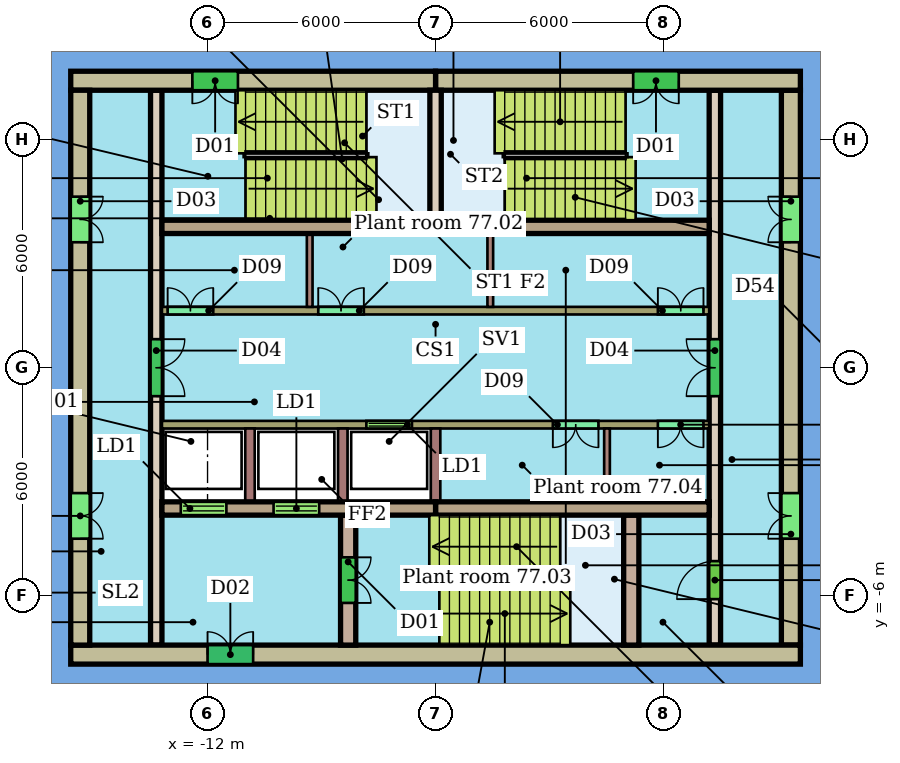
"""IFC4 building model, lengths in metres.
Left out: names, types, materials, properties, quantities, classifications, styles, units other than length and angle.
Written with IfcOpenShell. Run it as: python <this file> out.ifc"""

import sys

from ifc_helpers import new_model, si_unit, direction, frame, frame_2d, origin, place, context, subcontext, project, spatial, rectangle, extrude, element, fill, save


model = new_model("IFC4")
c1 = context("Model", 3, precision=1e-05, world=origin(), true_north=direction((0.0, 1.0)))
c2 = subcontext(c1, "Body", "Model", "MODEL_VIEW")
j1 = project(units=[si_unit("LENGTHUNIT", "METRE"), si_unit("PLANEANGLEUNIT", "RADIAN")], contexts=[c1])
p1 = place(None, origin())
s1 = spatial("IfcSite", under=j1, at=p1, CompositionType="ELEMENT")
p2 = place(p1, origin())
s2 = spatial("IfcBuilding", under=s1, at=p2, CompositionType="ELEMENT")
p3 = place(p2, frame((0.0, 0.0, 308.7)))
s3 = spatial("IfcBuildingStorey", under=s2, at=p3, CompositionType="ELEMENT", Elevation=308.7)
p4 = place(p3, frame((3.6, 7.55, 0.0), z_axis=(0.0, 0.0, 1.0), x_axis=(-1.0, 0.0, 0.0)))
e1 = element("IfcWall", 1, at=p4, inside=s3, PredefinedType="SHEAR", context=c2, shape_type="SweptSolid", body=[
    extrude(rectangle(XDim=9.6, YDim=0.5, at=frame_2d((4.8, 0.0))), origin(), (0.0, 0.0, 1.0), 3.9),
])
p5 = place(p4, frame((3.2, 0.0, 0.0)))
e2 = element("IfcOpeningElement", 2, at=p5, cuts=e1, PredefinedType="OPENING", context=c2, shape_type="SweptSolid", body=[
    extrude(rectangle(XDim=1.2, YDim=2.1, at=frame_2d((0.6, 1.05))), frame((0.0, 0.26, 0.0), z_axis=(0.0, -1.0, 0.0), x_axis=(1.0, 0.0, 0.0)), (0.0, 0.0, 1.0), 0.52),
])
p6 = place(p3, frame((-6.0, 7.55, 0.0), z_axis=(0.0, 0.0, 1.0), x_axis=(-1.0, 0.0, 0.0)))
e3 = element("IfcWall", 3, at=p6, inside=s3, PredefinedType="SHEAR", context=c2, shape_type="SweptSolid", body=[
    extrude(rectangle(XDim=9.6, YDim=0.5, at=frame_2d((4.8, 0.0))), origin(), (0.0, 0.0, 1.0), 3.9),
])
p7 = place(p6, frame((5.2, 0.0, 0.0)))
e4 = element("IfcOpeningElement", 4, at=p7, cuts=e3, PredefinedType="OPENING", context=c2, shape_type="SweptSolid", body=[
    extrude(rectangle(XDim=1.2, YDim=2.1, at=frame_2d((0.6, 1.05))), frame((0.0, 0.26, 0.0), z_axis=(0.0, -1.0, 0.0), x_axis=(1.0, 0.0, 0.0)), (0.0, 0.0, 1.0), 0.52),
])
p8 = place(p3, frame((-15.6, -7.55, 0.0), z_axis=(0.0, 0.0, 1.0), x_axis=(1.0, 0.0, 0.0)))
e5 = element("IfcWall", 5, at=p8, inside=s3, PredefinedType="SHEAR", context=c2, shape_type="SweptSolid", body=[
    extrude(rectangle(XDim=19.2, YDim=0.5, at=frame_2d((9.6, 0.0))), origin(), (0.0, 0.0, 1.0), 3.9),
])
p9 = place(p8, frame((3.6, 0.0, 0.0)))
e6 = element("IfcOpeningElement", 6, at=p9, cuts=e5, PredefinedType="OPENING", context=c2, shape_type="SweptSolid", body=[
    extrude(rectangle(XDim=1.2, YDim=2.1, at=frame_2d((0.6, 1.05))), frame((0.0, 0.26, 0.0), z_axis=(0.0, -1.0, 0.0), x_axis=(1.0, 0.0, 0.0)), (0.0, 0.0, 1.0), 0.52),
])
p10 = place(p3, frame((-15.35, 7.3, 0.0), z_axis=(0.0, 0.0, 1.0), x_axis=(0.0, -1.0, 0.0)))
e7 = element("IfcWall", 7, at=p10, inside=s3, PredefinedType="SHEAR", context=c2, shape_type="SweptSolid", body=[
    extrude(rectangle(XDim=14.6, YDim=0.5, at=frame_2d((7.3, 0.0))), origin(), (0.0, 0.0, 1.0), 3.9),
])
p11 = place(p10, frame((10.6, 0.0, 0.0)))
e8 = element("IfcOpeningElement", 8, at=p11, cuts=e7, PredefinedType="OPENING", context=c2, shape_type="SweptSolid", body=[
    extrude(rectangle(XDim=1.2, YDim=2.1, at=frame_2d((0.6, 1.05))), frame((0.0, 0.26, 0.0), z_axis=(0.0, -1.0, 0.0), x_axis=(1.0, 0.0, 0.0)), (0.0, 0.0, 1.0), 0.52),
])
p12 = place(p10, frame((2.8, 0.0, 0.0)))
e9 = element("IfcOpeningElement", 9, at=p12, cuts=e7, PredefinedType="OPENING", context=c2, shape_type="SweptSolid", body=[
    extrude(rectangle(XDim=1.2, YDim=2.1, at=frame_2d((0.6, 1.05))), frame((0.0, 0.26, 0.0), z_axis=(0.0, -1.0, 0.0), x_axis=(1.0, 0.0, 0.0)), (0.0, 0.0, 1.0), 0.52),
])
p13 = place(p3, frame((3.35, -7.3, 0.0), z_axis=(0.0, 0.0, 1.0), x_axis=(0.0, 1.0, 0.0)))
e10 = element("IfcWall", 10, at=p13, inside=s3, PredefinedType="SHEAR", context=c2, shape_type="SweptSolid", body=[
    extrude(rectangle(XDim=14.6, YDim=0.5, at=frame_2d((7.3, 0.0))), origin(), (0.0, 0.0, 1.0), 3.9),
])
p14 = place(p13, frame((2.8, 0.0, 0.0)))
e11 = element("IfcOpeningElement", 11, at=p14, cuts=e10, PredefinedType="OPENING", context=c2, shape_type="SweptSolid", body=[
    extrude(rectangle(XDim=1.2, YDim=2.1, at=frame_2d((0.6, 1.05))), frame((0.0, 0.26, 0.0), z_axis=(0.0, -1.0, 0.0), x_axis=(1.0, 0.0, 0.0)), (0.0, 0.0, 1.0), 0.52),
])
p15 = place(p13, frame((10.6, 0.0, 0.0)))
e12 = element("IfcOpeningElement", 12, at=p15, cuts=e10, PredefinedType="OPENING", context=c2, shape_type="SweptSolid", body=[
    extrude(rectangle(XDim=1.2, YDim=2.1, at=frame_2d((0.6, 1.05))), frame((0.0, 0.26, 0.0), z_axis=(0.0, -1.0, 0.0), x_axis=(1.0, 0.0, 0.0)), (0.0, 0.0, 1.0), 0.52),
])
for number, where, z_axis, x_axis in (
    (13, (-13.2, 3.705, 0.0), (0.0, 0.0, 1.0), (1.0, 0.0, 0.0)),
    (14, (-6.0, 3.705, 0.0), (0.0, 0.0, 1.0), (1.0, 0.0, 0.0)),
):
    element("IfcWall", number, at=place(p3, frame(where, z_axis=z_axis, x_axis=x_axis)), inside=s3, PredefinedType="SHEAR", context=c2, shape_type="SweptSolid", body=[
        extrude(rectangle(XDim=7.2, YDim=0.35, at=frame_2d((3.6, 0.0))), origin(), (0.0, 0.0, 1.0), 3.9),
    ])
p16 = place(p3, frame((-13.2, -3.705, 0.0), z_axis=(0.0, 0.0, 1.0), x_axis=(1.0, 0.0, 0.0)))
e15 = element("IfcWall", 15, at=p16, inside=s3, PredefinedType="SHEAR", context=c2, shape_type="SweptSolid", body=[
    extrude(rectangle(XDim=7.2, YDim=0.35, at=frame_2d((3.6, 0.0))), origin(), (0.0, 0.0, 1.0), 3.9),
])
p17 = place(p16, frame((0.496, 0.0, 0.0)))
e16 = element("IfcOpeningElement", 16, at=p17, cuts=e15, PredefinedType="OPENING", context=c2, shape_type="SweptSolid", body=[
    extrude(rectangle(XDim=1.2, YDim=2.1, at=frame_2d((0.6, 1.05))), frame((0.0, 0.185, 0.0), z_axis=(0.0, -1.0, 0.0), x_axis=(1.0, 0.0, 0.0)), (0.0, 0.0, 1.0), 0.37),
])
p18 = place(p16, frame((2.938, 0.0, 0.0)))
e17 = element("IfcOpeningElement", 17, at=p18, cuts=e15, PredefinedType="OPENING", context=c2, shape_type="SweptSolid", body=[
    extrude(rectangle(XDim=1.2, YDim=2.1, at=frame_2d((0.6, 1.05))), frame((0.0, 0.185, 0.0), z_axis=(0.0, -1.0, 0.0), x_axis=(1.0, 0.0, 0.0)), (0.0, 0.0, 1.0), 0.37),
])
p19 = place(p3, frame((-6.0, -3.705, 0.0), z_axis=(0.0, 0.0, 1.0), x_axis=(1.0, 0.0, 0.0)))
e18 = element("IfcWall", 18, at=p19, inside=s3, PredefinedType="SHEAR", context=c2, shape_type="SweptSolid", body=[
    extrude(rectangle(XDim=7.2, YDim=0.35, at=frame_2d((3.6, 0.0))), origin(), (0.0, 0.0, 1.0), 3.9),
])
p20 = place(p3, frame((-13.35, 7.3, 0.0), z_axis=(0.0, 0.0, 1.0), x_axis=(0.0, -1.0, 0.0)))
e19 = element("IfcWall", 19, at=p20, inside=s3, PredefinedType="SHEAR", context=c2, shape_type="SweptSolid", body=[
    extrude(rectangle(XDim=14.6, YDim=0.3, at=frame_2d((7.3, 0.0))), origin(), (0.0, 0.0, 1.0), 3.9),
])
p21 = place(p20, frame((6.55, 0.0, 0.0)))
e20 = element("IfcOpeningElement", 20, at=p21, cuts=e19, PredefinedType="OPENING", context=c2, shape_type="SweptSolid", body=[
    extrude(rectangle(XDim=1.5, YDim=2.1, at=frame_2d((0.75, 1.05))), frame((0.0, 0.16, 0.0), z_axis=(0.0, -1.0, 0.0), x_axis=(1.0, 0.0, 0.0)), (0.0, 0.0, 1.0), 0.32),
])
p22 = place(p3, frame((1.35, -7.3, 0.0), z_axis=(0.0, 0.0, 1.0), x_axis=(0.0, 1.0, 0.0)))
e21 = element("IfcWall", 21, at=p22, inside=s3, PredefinedType="SHEAR", context=c2, shape_type="SweptSolid", body=[
    extrude(rectangle(XDim=14.6, YDim=0.3, at=frame_2d((7.3, 0.0))), origin(), (0.0, 0.0, 1.0), 3.9),
])
p23 = place(p22, frame((1.21, 0.0, 0.0)))
e22 = element("IfcOpeningElement", 22, at=p23, cuts=e21, PredefinedType="OPENING", context=c2, shape_type="SweptSolid", body=[
    extrude(rectangle(XDim=1.0, YDim=2.1, at=frame_2d((0.5, 1.05))), frame((0.0, 0.16, 0.0), z_axis=(0.0, -1.0, 0.0), x_axis=(1.0, 0.0, 0.0)), (0.0, 0.0, 1.0), 0.32),
])
p24 = place(p22, frame((6.55, 0.0, 0.0)))
e23 = element("IfcOpeningElement", 23, at=p24, cuts=e21, PredefinedType="OPENING", context=c2, shape_type="SweptSolid", body=[
    extrude(rectangle(XDim=1.5, YDim=2.1, at=frame_2d((0.75, 1.05))), frame((0.0, 0.16, 0.0), z_axis=(0.0, -1.0, 0.0), x_axis=(1.0, 0.0, 0.0)), (0.0, 0.0, 1.0), 0.32),
])
p25 = place(p3, frame((-13.2, 1.5, 0.0), z_axis=(0.0, 0.0, 1.0), x_axis=(1.0, 0.0, 0.0)))
e24 = element("IfcWall", 24, at=p25, inside=s3, PredefinedType="SHEAR", context=c2, shape_type="SweptSolid", body=[
    extrude(rectangle(XDim=14.4, YDim=0.2, at=frame_2d((7.2, 0.0))), origin(), (0.0, 0.0, 1.0), 3.9),
])
p26 = place(p25, frame((0.15, 0.0, 0.0)))
e25 = element("IfcOpeningElement", 25, at=p26, cuts=e24, PredefinedType="OPENING", context=c2, shape_type="SweptSolid", body=[
    extrude(rectangle(XDim=1.2, YDim=2.4, at=frame_2d((0.6, 1.2))), frame((0.0, 0.11, 0.0), z_axis=(0.0, -1.0, 0.0), x_axis=(1.0, 0.0, 0.0)), (0.0, 0.0, 1.0), 0.22),
])
p27 = place(p25, frame((4.113, 0.0, 0.0)))
e26 = element("IfcOpeningElement", 26, at=p27, cuts=e24, PredefinedType="OPENING", context=c2, shape_type="SweptSolid", body=[
    extrude(rectangle(XDim=1.2, YDim=2.4, at=frame_2d((0.6, 1.2))), frame((0.0, 0.11, 0.0), z_axis=(0.0, -1.0, 0.0), x_axis=(1.0, 0.0, 0.0)), (0.0, 0.0, 1.0), 0.22),
])
p28 = place(p25, frame((13.05, 0.0, 0.0)))
e27 = element("IfcOpeningElement", 27, at=p28, cuts=e24, PredefinedType="OPENING", context=c2, shape_type="SweptSolid", body=[
    extrude(rectangle(XDim=1.2, YDim=2.4, at=frame_2d((0.6, 1.2))), frame((0.0, 0.11, 0.0), z_axis=(0.0, -1.0, 0.0), x_axis=(1.0, 0.0, 0.0)), (0.0, 0.0, 1.0), 0.22),
])
p29 = place(p3, frame((1.2, -1.5, 0.0), z_axis=(0.0, 0.0, 1.0), x_axis=(-1.0, 0.0, 0.0)))
e28 = element("IfcWall", 28, at=p29, inside=s3, PredefinedType="SHEAR", context=c2, shape_type="SweptSolid", body=[
    extrude(rectangle(XDim=14.4, YDim=0.2, at=frame_2d((7.2, 0.0))), origin(), (0.0, 0.0, 1.0), 3.9),
])
p30 = place(p29, frame((7.821, 0.0, 0.0)))
e29 = element("IfcOpeningElement", 29, at=p30, cuts=e28, PredefinedType="OPENING", context=c2, shape_type="SweptSolid", body=[
    extrude(rectangle(XDim=1.2, YDim=2.1, at=frame_2d((0.6, 1.05))), frame((0.0, 0.11, 0.0), z_axis=(0.0, -1.0, 0.0), x_axis=(1.0, 0.0, 0.0)), (0.0, 0.0, 1.0), 0.22),
])
p31 = place(p29, frame((2.914, 0.0, 0.0)))
e30 = element("IfcOpeningElement", 30, at=p31, cuts=e28, PredefinedType="OPENING", context=c2, shape_type="SweptSolid", body=[
    extrude(rectangle(XDim=1.2, YDim=2.4, at=frame_2d((0.6, 1.2))), frame((0.0, 0.11, 0.0), z_axis=(0.0, -1.0, 0.0), x_axis=(1.0, 0.0, 0.0)), (0.0, 0.0, 1.0), 0.22),
])
p32 = place(p29, frame((0.15, 0.0, 0.0)))
e31 = element("IfcOpeningElement", 31, at=p32, cuts=e28, PredefinedType="OPENING", context=c2, shape_type="SweptSolid", body=[
    extrude(rectangle(XDim=1.2, YDim=2.4, at=frame_2d((0.6, 1.2))), frame((0.0, 0.11, 0.0), z_axis=(0.0, -1.0, 0.0), x_axis=(1.0, 0.0, 0.0)), (0.0, 0.0, 1.0), 0.22),
])
p33 = place(p3, frame((-8.3, -3.88, 0.0), z_axis=(0.0, 0.0, 1.0), x_axis=(0.0, -1.0, 0.0)))
e32 = element("IfcWall", 32, at=p33, inside=s3, PredefinedType="SHEAR", context=c2, shape_type="SweptSolid", body=[
    extrude(rectangle(XDim=3.42, YDim=0.4, at=frame_2d((1.71, 0.0))), origin(), (0.0, 0.0, 1.0), 3.9),
])
p34 = place(p33, frame((1.11, 0.0, 0.0)))
e33 = element("IfcOpeningElement", 33, at=p34, cuts=e32, PredefinedType="OPENING", context=c2, shape_type="SweptSolid", body=[
    extrude(rectangle(XDim=1.2, YDim=2.1, at=frame_2d((0.6, 1.05))), frame((0.0, 0.21, 0.0), z_axis=(0.0, -1.0, 0.0), x_axis=(1.0, 0.0, 0.0)), (0.0, 0.0, 1.0), 0.42),
])
p35 = place(p3, frame((-0.85, -3.88, 0.0), z_axis=(0.0, 0.0, 1.0), x_axis=(0.0, -1.0, 0.0)))
e34 = element("IfcWall", 34, at=p35, inside=s3, PredefinedType="SHEAR", context=c2, shape_type="SweptSolid", body=[
    extrude(rectangle(XDim=3.42, YDim=0.4, at=frame_2d((1.71, 0.0))), origin(), (0.0, 0.0, 1.0), 3.9),
])
p36 = place(p3, frame((-6.0, 3.88, 0.0), z_axis=(0.0, 0.0, 1.0), x_axis=(0.0, 1.0, 0.0)))
e35 = element("IfcWall", 35, at=p36, inside=s3, PredefinedType="SHEAR", context=c2, shape_type="SweptSolid", body=[
    extrude(rectangle(XDim=3.42, YDim=0.3, at=frame_2d((1.71, 0.0))), origin(), (0.0, 0.0, 1.0), 3.9),
])
for number, where, z_axis, x_axis in (
    (36, (-9.312, 1.6, 0.0), (0.0, 0.0, 1.0), (0.0, 1.0, 0.0)),
    (37, (-4.56, 1.6, 0.0), (0.0, 0.0, 1.0), (0.0, 1.0, 0.0)),
):
    element("IfcWall", number, at=place(p3, frame(where, z_axis=z_axis, x_axis=x_axis)), inside=s3, PredefinedType="PARTITIONING", context=c2, shape_type="SweptSolid", body=[
        extrude(rectangle(XDim=1.93, YDim=0.15, at=frame_2d((0.965, 0.0))), origin(), (0.0, 0.0, 1.0), 3.9),
    ])
for number, where, z_axis, x_axis in (
    (38, (-10.883, -1.6, 0.0), (0.0, 0.0, 1.0), (0.0, -1.0, 0.0)),
    (39, (-8.442, -1.6, 0.0), (0.0, 0.0, 1.0), (0.0, -1.0, 0.0)),
    (40, (-6.0, -1.6, 0.0), (0.0, 0.0, 1.0), (0.0, -1.0, 0.0)),
):
    element("IfcWall", number, at=place(p3, frame(where, z_axis=z_axis, x_axis=x_axis)), inside=s3, PredefinedType="SHEAR", context=c2, shape_type="SweptSolid", body=[
        extrude(rectangle(XDim=1.93, YDim=0.25, at=frame_2d((0.965, 0.0))), origin(), (0.0, 0.0, 1.0), 3.9),
    ])
p37 = place(p3, frame((-1.489, -1.6, 0.0), z_axis=(0.0, 0.0, 1.0), x_axis=(0.0, -1.0, 0.0)))
e41 = element("IfcWall", 41, at=p37, inside=s3, PredefinedType="PARTITIONING", context=c2, shape_type="SweptSolid", body=[
    extrude(rectangle(XDim=1.93, YDim=0.15, at=frame_2d((0.965, 0.0))), origin(), (0.0, 0.0, 1.0), 3.9),
])
p38 = place(p5, origin())
e42 = element("IfcDoor", 42, at=p38, inside=s3, OperationType="DOUBLE_DOOR_SINGLE_SWING", PredefinedType="NOTDEFINED", context=c2, shape_type="SweptSolid", body=[
    extrude(rectangle(XDim=1.2, YDim=2.1, at=frame_2d((0.6, 1.05))), frame((0.0, 0.025, 0.0), z_axis=(0.0, -1.0, 0.0), x_axis=(1.0, 0.0, 0.0)), (0.0, 0.0, 1.0), 0.05),
])
fill(e2, e42)
p39 = place(p7, origin())
e43 = element("IfcDoor", 43, at=p39, inside=s3, OperationType="DOUBLE_DOOR_SINGLE_SWING", PredefinedType="NOTDEFINED", context=c2, shape_type="SweptSolid", body=[
    extrude(rectangle(XDim=1.2, YDim=2.1, at=frame_2d((0.6, 1.05))), frame((0.0, 0.025, 0.0), z_axis=(0.0, -1.0, 0.0), x_axis=(1.0, 0.0, 0.0)), (0.0, 0.0, 1.0), 0.05),
])
fill(e4, e43)
p40 = place(p9, origin())
e44 = element("IfcDoor", 44, at=p40, inside=s3, OperationType="DOUBLE_DOOR_SINGLE_SWING", PredefinedType="NOTDEFINED", context=c2, shape_type="SweptSolid", body=[
    extrude(rectangle(XDim=1.2, YDim=2.1, at=frame_2d((0.6, 1.05))), frame((0.0, 0.025, 0.0), z_axis=(0.0, -1.0, 0.0), x_axis=(1.0, 0.0, 0.0)), (0.0, 0.0, 1.0), 0.05),
])
fill(e6, e44)
p41 = place(p11, origin())
e45 = element("IfcDoor", 45, at=p41, inside=s3, OperationType="DOUBLE_DOOR_SINGLE_SWING", PredefinedType="NOTDEFINED", context=c2, shape_type="SweptSolid", body=[
    extrude(rectangle(XDim=1.2, YDim=2.1, at=frame_2d((0.6, 1.05))), frame((0.0, 0.025, 0.0), z_axis=(0.0, -1.0, 0.0), x_axis=(1.0, 0.0, 0.0)), (0.0, 0.0, 1.0), 0.05),
])
fill(e8, e45)
p42 = place(p12, origin())
e46 = element("IfcDoor", 46, at=p42, inside=s3, OperationType="DOUBLE_DOOR_SINGLE_SWING", PredefinedType="NOTDEFINED", context=c2, shape_type="SweptSolid", body=[
    extrude(rectangle(XDim=1.2, YDim=2.1, at=frame_2d((0.6, 1.05))), frame((0.0, 0.025, 0.0), z_axis=(0.0, -1.0, 0.0), x_axis=(1.0, 0.0, 0.0)), (0.0, 0.0, 1.0), 0.05),
])
fill(e9, e46)
p43 = place(p14, origin())
e47 = element("IfcDoor", 47, at=p43, inside=s3, OperationType="DOUBLE_DOOR_SINGLE_SWING", PredefinedType="NOTDEFINED", context=c2, shape_type="SweptSolid", body=[
    extrude(rectangle(XDim=1.2, YDim=2.1, at=frame_2d((0.6, 1.05))), frame((0.0, 0.025, 0.0), z_axis=(0.0, -1.0, 0.0), x_axis=(1.0, 0.0, 0.0)), (0.0, 0.0, 1.0), 0.05),
])
fill(e11, e47)
p44 = place(p15, origin())
e48 = element("IfcDoor", 48, at=p44, inside=s3, OperationType="DOUBLE_DOOR_SINGLE_SWING", PredefinedType="NOTDEFINED", context=c2, shape_type="SweptSolid", body=[
    extrude(rectangle(XDim=1.2, YDim=2.1, at=frame_2d((0.6, 1.05))), frame((0.0, 0.025, 0.0), z_axis=(0.0, -1.0, 0.0), x_axis=(1.0, 0.0, 0.0)), (0.0, 0.0, 1.0), 0.05),
])
fill(e12, e48)
p45 = place(p17, origin())
e49 = element("IfcDoor", 49, at=p45, inside=s3, OperationType="DOUBLE_DOOR_SLIDING", PredefinedType="NOTDEFINED", context=c2, shape_type="SweptSolid", body=[
    extrude(rectangle(XDim=1.2, YDim=2.1, at=frame_2d((0.6, 1.05))), frame((0.0, 0.025, 0.0), z_axis=(0.0, -1.0, 0.0), x_axis=(1.0, 0.0, 0.0)), (0.0, 0.0, 1.0), 0.05),
])
fill(e16, e49)
p46 = place(p18, origin())
e50 = element("IfcDoor", 50, at=p46, inside=s3, OperationType="DOUBLE_DOOR_SLIDING", PredefinedType="NOTDEFINED", context=c2, shape_type="SweptSolid", body=[
    extrude(rectangle(XDim=1.2, YDim=2.1, at=frame_2d((0.6, 1.05))), frame((0.0, 0.025, 0.0), z_axis=(0.0, -1.0, 0.0), x_axis=(1.0, 0.0, 0.0)), (0.0, 0.0, 1.0), 0.05),
])
fill(e17, e50)
p47 = place(p21, origin())
e51 = element("IfcDoor", 51, at=p47, inside=s3, OperationType="DOUBLE_DOOR_SINGLE_SWING", PredefinedType="NOTDEFINED", context=c2, shape_type="SweptSolid", body=[
    extrude(rectangle(XDim=1.5, YDim=2.1, at=frame_2d((0.75, 1.05))), frame((0.0, 0.025, 0.0), z_axis=(0.0, -1.0, 0.0), x_axis=(1.0, 0.0, 0.0)), (0.0, 0.0, 1.0), 0.05),
])
fill(e20, e51)
p48 = place(p23, origin())
e52 = element("IfcDoor", 52, at=p48, inside=s3, OperationType="SINGLE_SWING_LEFT", PredefinedType="NOTDEFINED", context=c2, shape_type="SweptSolid", body=[
    extrude(rectangle(XDim=1.0, YDim=2.1, at=frame_2d((0.5, 1.05))), frame((0.0, 0.025, 0.0), z_axis=(0.0, -1.0, 0.0), x_axis=(1.0, 0.0, 0.0)), (0.0, 0.0, 1.0), 0.05),
])
fill(e22, e52)
p49 = place(p24, origin())
e53 = element("IfcDoor", 53, at=p49, inside=s3, OperationType="DOUBLE_DOOR_SINGLE_SWING", PredefinedType="NOTDEFINED", context=c2, shape_type="SweptSolid", body=[
    extrude(rectangle(XDim=1.5, YDim=2.1, at=frame_2d((0.75, 1.05))), frame((0.0, 0.025, 0.0), z_axis=(0.0, -1.0, 0.0), x_axis=(1.0, 0.0, 0.0)), (0.0, 0.0, 1.0), 0.05),
])
fill(e23, e53)
p50 = place(p26, origin())
e54 = element("IfcDoor", 54, at=p50, inside=s3, OperationType="DOUBLE_DOOR_SINGLE_SWING", PredefinedType="NOTDEFINED", context=c2, shape_type="SweptSolid", body=[
    extrude(rectangle(XDim=1.2, YDim=2.4, at=frame_2d((0.6, 1.2))), frame((0.0, 0.025, 0.0), z_axis=(0.0, -1.0, 0.0), x_axis=(1.0, 0.0, 0.0)), (0.0, 0.0, 1.0), 0.05),
])
fill(e25, e54)
p51 = place(p27, origin())
e55 = element("IfcDoor", 55, at=p51, inside=s3, OperationType="DOUBLE_DOOR_SINGLE_SWING", PredefinedType="NOTDEFINED", context=c2, shape_type="SweptSolid", body=[
    extrude(rectangle(XDim=1.2, YDim=2.4, at=frame_2d((0.6, 1.2))), frame((0.0, 0.025, 0.0), z_axis=(0.0, -1.0, 0.0), x_axis=(1.0, 0.0, 0.0)), (0.0, 0.0, 1.0), 0.05),
])
fill(e26, e55)
p52 = place(p28, origin())
e56 = element("IfcDoor", 56, at=p52, inside=s3, OperationType="DOUBLE_DOOR_SINGLE_SWING", PredefinedType="NOTDEFINED", context=c2, shape_type="SweptSolid", body=[
    extrude(rectangle(XDim=1.2, YDim=2.4, at=frame_2d((0.6, 1.2))), frame((0.0, 0.025, 0.0), z_axis=(0.0, -1.0, 0.0), x_axis=(1.0, 0.0, 0.0)), (0.0, 0.0, 1.0), 0.05),
])
fill(e27, e56)
p53 = place(p30, origin())
e57 = element("IfcDoor", 57, at=p53, inside=s3, OperationType="DOUBLE_DOOR_SLIDING", PredefinedType="NOTDEFINED", context=c2, shape_type="SweptSolid", body=[
    extrude(rectangle(XDim=1.2, YDim=2.1, at=frame_2d((0.6, 1.05))), frame((0.0, 0.025, 0.0), z_axis=(0.0, -1.0, 0.0), x_axis=(1.0, 0.0, 0.0)), (0.0, 0.0, 1.0), 0.05),
])
fill(e29, e57)
p54 = place(p31, origin())
e58 = element("IfcDoor", 58, at=p54, inside=s3, OperationType="DOUBLE_DOOR_SINGLE_SWING", PredefinedType="NOTDEFINED", context=c2, shape_type="SweptSolid", body=[
    extrude(rectangle(XDim=1.2, YDim=2.4, at=frame_2d((0.6, 1.2))), frame((0.0, 0.025, 0.0), z_axis=(0.0, -1.0, 0.0), x_axis=(1.0, 0.0, 0.0)), (0.0, 0.0, 1.0), 0.05),
])
fill(e30, e58)
p55 = place(p32, origin())
e59 = element("IfcDoor", 59, at=p55, inside=s3, OperationType="DOUBLE_DOOR_SINGLE_SWING", PredefinedType="NOTDEFINED", context=c2, shape_type="SweptSolid", body=[
    extrude(rectangle(XDim=1.2, YDim=2.4, at=frame_2d((0.6, 1.2))), frame((0.0, 0.025, 0.0), z_axis=(0.0, -1.0, 0.0), x_axis=(1.0, 0.0, 0.0)), (0.0, 0.0, 1.0), 0.05),
])
fill(e31, e59)
p56 = place(p34, origin())
e60 = element("IfcDoor", 60, at=p56, inside=s3, OperationType="DOUBLE_DOOR_SINGLE_SWING", PredefinedType="NOTDEFINED", context=c2, shape_type="SweptSolid", body=[
    extrude(rectangle(XDim=1.2, YDim=2.1, at=frame_2d((0.6, 1.05))), frame((0.0, 0.025, 0.0), z_axis=(0.0, -1.0, 0.0), x_axis=(1.0, 0.0, 0.0)), (0.0, 0.0, 1.0), 0.05),
])
fill(e33, e60)
save(model, sys.argv[1])
